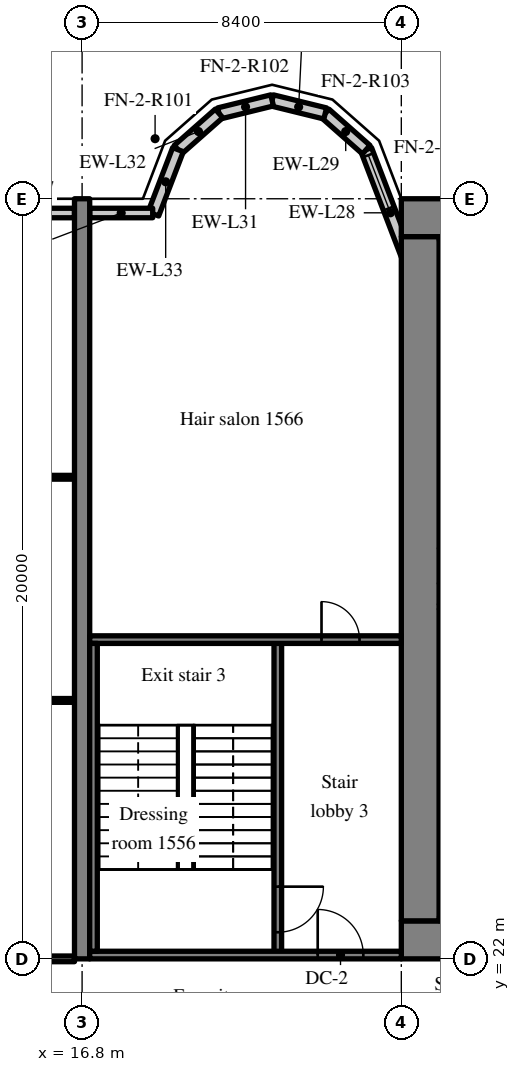
"""IFC4 building model, lengths in metres.
Left out: names, types, materials, properties, quantities, classifications, styles, units other than length and angle.
Written with IfcOpenShell. Run it as: python <this file> out.ifc"""

import sys

from ifc_helpers import new_model, si_unit, direction, frame, frame_2d, origin, place, context, subcontext, project, spatial, rectangle, extrude, source, transform, mapped, element, fill, save


model = new_model("IFC4")
c1 = context("Model", 3, precision=1e-05, world=origin(), true_north=direction((0.0, 1.0)))
c2 = subcontext(c1, "Body", "Model", "MODEL_VIEW")
j1 = project(units=[si_unit("LENGTHUNIT", "METRE"), si_unit("PLANEANGLEUNIT", "RADIAN")], contexts=[c1])
p1 = place(None, origin())
s1 = spatial("IfcSite", under=j1, at=p1, CompositionType="ELEMENT")
p2 = place(p1, origin())
s2 = spatial("IfcBuilding", under=s1, at=p2, CompositionType="ELEMENT")
p3 = place(p2, frame((0.0, 0.0, 65.8)))
s3 = spatial("IfcBuildingStorey", under=s2, at=p3, CompositionType="ELEMENT", Elevation=65.8)
m1 = source(origin(), c2, "Body", "SweptSolid", [
    extrude(rectangle(XDim=50.4, YDim=1.0, at=frame_2d((25.2, 0.0))), origin(), (0.0, 0.0, 1.0), 3.52),
])
p4 = place(p3, frame((25.2, 22.5, 0.0), z_axis=(0.0, 0.0, 1.0), x_axis=(1.0, 0.0, 0.0)))
e1 = element("IfcWall", 1, at=p4, inside=s3, PredefinedType="SHEAR", context=c2, shape_type="MappedRepresentation", body=[
    mapped(m1, transform((0.0, 0.0, 0.0), scale=1.0)),
])
m2 = source(origin(), c2, "Body", "SweptSolid", [
    extrude(rectangle(XDim=1.8, YDim=2.1, at=frame_2d((0.9, 1.05))), frame((0.0, 0.51, 0.0), z_axis=(0.0, -1.0, 0.0), x_axis=(1.0, 0.0, 0.0)), (0.0, 0.0, 1.0), 1.02),
])
p5 = place(p4, frame((15.9, 0.0, 0.0)))
e2 = element("IfcOpeningElement", 2, at=p5, cuts=e1, PredefinedType="OPENING", context=c2, shape_type="MappedRepresentation", body=[
    mapped(m2, transform((0.0, 0.0, 0.0), scale=1.0)),
])
m3 = source(origin(), c2, "Body", "SweptSolid", [
    extrude(rectangle(XDim=1.2, YDim=2.1, at=frame_2d((0.6, 1.05))), frame((0.0, 0.51, 0.0), z_axis=(0.0, -1.0, 0.0), x_axis=(1.0, 0.0, 0.0)), (0.0, 0.0, 1.0), 1.02),
])
p6 = place(p4, frame((26.987, 0.0, 0.0)))
e3 = element("IfcOpeningElement", 3, at=p6, cuts=e1, PredefinedType="OPENING", context=c2, shape_type="MappedRepresentation", body=[
    mapped(m3, transform((0.0, 0.0, 0.0), scale=1.0)),
])
m4 = source(origin(), c2, "Body", "SweptSolid", [
    extrude(rectangle(XDim=0.9, YDim=2.1, at=frame_2d((0.45, 1.05))), frame((0.0, 0.51, 0.0), z_axis=(0.0, -1.0, 0.0), x_axis=(1.0, 0.0, 0.0)), (0.0, 0.0, 1.0), 1.02),
])
p7 = place(p4, frame((34.5, 0.0, 0.0)))
e4 = element("IfcOpeningElement", 4, at=p7, cuts=e1, PredefinedType="OPENING", context=c2, shape_type="MappedRepresentation", body=[
    mapped(m4, transform((0.0, 0.0, 0.0), scale=1.0)),
])
p8 = place(p4, frame((31.5, 0.0, 0.0)))
e5 = element("IfcOpeningElement", 5, at=p8, cuts=e1, PredefinedType="OPENING", context=c2, shape_type="MappedRepresentation", body=[
    mapped(m4, transform((0.0, 0.0, 0.0), scale=1.0)),
])
p9 = place(p4, frame((39.769, 0.0, 0.0)))
e6 = element("IfcOpeningElement", 6, at=p9, cuts=e1, PredefinedType="OPENING", context=c2, shape_type="MappedRepresentation", body=[
    mapped(m4, transform((0.0, 0.0, 0.0), scale=1.0)),
])
p10 = place(p4, frame((36.756, 0.0, 0.0)))
e7 = element("IfcOpeningElement", 7, at=p10, cuts=e1, PredefinedType="OPENING", context=c2, shape_type="MappedRepresentation", body=[
    mapped(m4, transform((0.0, 0.0, 0.0), scale=1.0)),
])
p11 = place(p4, frame((6.438, 0.0, 0.0)))
e8 = element("IfcOpeningElement", 8, at=p11, cuts=e1, PredefinedType="OPENING", context=c2, shape_type="MappedRepresentation", body=[
    mapped(m3, transform((0.0, 0.0, 0.0), scale=1.0)),
])
p12 = place(p4, frame((47.725, 0.0, 0.0)))
e9 = element("IfcOpeningElement", 9, at=p12, cuts=e1, PredefinedType="OPENING", context=c2, shape_type="MappedRepresentation", body=[
    mapped(m3, transform((0.0, 0.0, 0.0), scale=1.0)),
])
p13 = place(p3, frame((25.2, 41.5, 0.0), z_axis=(0.0, 0.0, 1.0), x_axis=(1.0, 0.0, 0.0)))
e10 = element("IfcWall", 10, at=p13, inside=s3, PredefinedType="SHEAR", context=c2, shape_type="MappedRepresentation", body=[
    mapped(m1, transform((0.0, 0.0, 0.0), scale=1.0)),
])
m5 = source(origin(), c2, "Body", "SweptSolid", [
    extrude(rectangle(XDim=18.0, YDim=1.0, at=frame_2d((9.0, 0.0))), origin(), (0.0, 0.0, 1.0), 3.52),
])
p14 = place(p3, frame((25.7, 23.0, 0.0), z_axis=(0.0, 0.0, 1.0), x_axis=(0.0, 1.0, 0.0)))
e11 = element("IfcWall", 11, at=p14, inside=s3, PredefinedType="SHEAR", context=c2, shape_type="MappedRepresentation", body=[
    mapped(m5, transform((0.0, 0.0, 0.0), scale=1.0)),
])
m6 = source(origin(), c2, "Body", "SweptSolid", [
    extrude(rectangle(XDim=20.0, YDim=0.4, at=frame_2d((10.0, 0.0))), origin(), (0.0, 0.0, 1.0), 3.52),
])
p15 = place(p3, frame((16.8, 22.0, 0.0), z_axis=(0.0, 0.0, 1.0), x_axis=(0.0, 1.0, 0.0)))
e12 = element("IfcWall", 12, at=p15, inside=s3, PredefinedType="SHEAR", context=c2, shape_type="MappedRepresentation", body=[
    mapped(m6, transform((0.0, 0.0, 0.0), scale=1.0)),
])
m7 = source(origin(), c2, "Body", "SweptSolid", [
    extrude(rectangle(XDim=3.559, YDim=0.3, at=frame_2d((1.78, 0.0))), origin(), (0.0, 0.0, 1.0), 3.52),
])
p16 = place(p3, frame((25.55, 39.969, 0.0), z_axis=(0.0, 0.0, 1.0), x_axis=(-0.35779745313, 0.933799219604, 0.0)))
e13 = element("IfcWall", 13, at=p16, inside=s3, PredefinedType="SOLIDWALL", context=c2, shape_type="MappedRepresentation", body=[
    mapped(m7, transform((0.0, 0.0, 0.0), scale=1.0)),
])
m8 = source(origin(), c2, "Body", "SweptSolid", [
    extrude(rectangle(XDim=1.5, YDim=2.0, at=frame_2d((0.75, 1.0))), frame((0.0, 0.16, 0.0), z_axis=(0.0, -1.0, 0.0), x_axis=(1.0, 0.0, 0.0)), (0.0, 0.0, 1.0), 0.32),
])
p17 = place(p16, frame((1.903, 0.0, 0.9)))
e14 = element("IfcOpeningElement", 14, at=p17, cuts=e13, PredefinedType="OPENING", context=c2, shape_type="MappedRepresentation", body=[
    mapped(m8, transform((0.0, 0.0, 0.0), scale=1.0)),
])
m9 = source(origin(), c2, "Body", "SweptSolid", [
    extrude(rectangle(XDim=1.44, YDim=0.3, at=frame_2d((0.72, 0.0))), origin(), (0.0, 0.0, 1.0), 3.52),
])
p18 = place(p3, frame((24.277, 43.292, 0.0), z_axis=(0.0, 0.0, 1.0), x_axis=(-0.749649827867, 0.661834673902, 0.0)))
e15 = element("IfcWall", 15, at=p18, inside=s3, PredefinedType="SOLIDWALL", context=c2, shape_type="MappedRepresentation", body=[
    mapped(m9, transform((0.0, 0.0, 0.0), scale=1.0)),
])
m10 = source(origin(), c2, "Body", "SweptSolid", [
    extrude(rectangle(XDim=1.438, YDim=0.3, at=frame_2d((0.719, 0.0))), origin(), (0.0, 0.0, 1.0), 3.52),
])
p19 = place(p3, frame((23.197, 44.245, 0.0), z_axis=(0.0, 0.0, 1.0), x_axis=(-0.971152283879, 0.238460146601, 0.0)))
e16 = element("IfcWall", 16, at=p19, inside=s3, PredefinedType="SOLIDWALL", context=c2, shape_type="MappedRepresentation", body=[
    mapped(m10, transform((0.0, 0.0, 0.0), scale=1.0)),
])
m11 = source(origin(), c2, "Body", "SweptSolid", [
    extrude(rectangle(XDim=1.439, YDim=0.3, at=frame_2d((0.719, 0.0))), origin(), (0.0, 0.0, 1.0), 3.52),
])
p20 = place(p3, frame((21.8, 44.588, 0.0), z_axis=(0.0, 0.0, 1.0), x_axis=(-0.971161932466, -0.238420848351, 0.0)))
e17 = element("IfcWall", 17, at=p20, inside=s3, PredefinedType="SOLIDWALL", context=c2, shape_type="MappedRepresentation", body=[
    mapped(m11, transform((0.0, 0.0, 0.0), scale=1.0)),
])
m12 = source(origin(), c2, "Body", "SweptSolid", [
    extrude(rectangle(XDim=1.44, YDim=0.3, at=frame_2d((0.72, 0.0))), origin(), (0.0, 0.0, 1.0), 3.52),
])
p21 = place(p3, frame((20.403, 44.245, 0.0), z_axis=(0.0, 0.0, 1.0), x_axis=(-0.74957555648, -0.661918790432, 0.0)))
e18 = element("IfcWall", 18, at=p21, inside=s3, PredefinedType="SOLIDWALL", context=c2, shape_type="MappedRepresentation", body=[
    mapped(m12, transform((0.0, 0.0, 0.0), scale=1.0)),
])
m13 = source(origin(), c2, "Body", "SweptSolid", [
    extrude(rectangle(XDim=1.812, YDim=0.3, at=frame_2d((0.906, 0.0))), origin(), (0.0, 0.0, 1.0), 3.52),
])
p22 = place(p3, frame((19.323, 43.292, 0.0), z_axis=(0.0, 0.0, 1.0), x_axis=(-0.357877270961, -0.93376863244, 0.0)))
e19 = element("IfcWall", 19, at=p22, inside=s3, PredefinedType="SOLIDWALL", context=c2, shape_type="MappedRepresentation", body=[
    mapped(m13, transform((0.0, 0.0, 0.0), scale=1.0)),
])
m14 = source(origin(), c2, "Body", "SweptSolid", [
    extrude(rectangle(XDim=3.6, YDim=0.25, at=frame_2d((1.8, 0.0))), origin(), (0.0, 0.0, 1.0), 2.82),
])
p23 = place(p3, frame((16.6, 41.625, 0.0), z_axis=(0.0, 0.0, 1.0), x_axis=(-1.0, 0.0, 0.0)))
e20 = element("IfcWall", 20, at=p23, inside=s3, PredefinedType="SOLIDWALL", context=c2, shape_type="MappedRepresentation", body=[
    mapped(m14, transform((0.0, 0.0, 0.0), scale=1.0)),
])
m15 = source(origin(), c2, "Body", "SweptSolid", [
    extrude(rectangle(XDim=1.5, YDim=1.5, at=frame_2d((0.75, 0.75))), frame((0.0, 0.135, 0.0), z_axis=(0.0, -1.0, 0.0), x_axis=(1.0, 0.0, 0.0)), (0.0, 0.0, 1.0), 0.27),
])
p24 = place(p23, frame((1.05, 0.0, 0.9)))
e21 = element("IfcOpeningElement", 21, at=p24, cuts=e20, PredefinedType="OPENING", context=c2, shape_type="MappedRepresentation", body=[
    mapped(m15, transform((0.0, 0.0, 0.0), scale=1.0)),
])
m16 = source(origin(), c2, "Body", "SweptSolid", [
    extrude(rectangle(XDim=1.658, YDim=0.25, at=frame_2d((0.829, 0.0))), origin(), (0.0, 0.0, 1.0), 2.82),
])
p25 = place(p3, frame((18.658, 41.625, 0.0), z_axis=(0.0, 0.0, 1.0), x_axis=(-1.0, 0.0, 0.0)))
e22 = element("IfcWall", 22, at=p25, inside=s3, PredefinedType="SOLIDWALL", context=c2, shape_type="MappedRepresentation", body=[
    mapped(m16, transform((0.0, 0.0, 0.0), scale=1.0)),
])
m17 = source(origin(), c2, "Body", "SweptSolid", [
    extrude(rectangle(XDim=8.3, YDim=0.2, at=frame_2d((4.15, 0.0))), origin(), (0.0, 0.0, 1.0), 3.52),
])
p26 = place(p3, frame((21.95, 22.1, 0.0), z_axis=(0.0, 0.0, 1.0), x_axis=(0.0, 1.0, 0.0)))
e23 = element("IfcWall", 23, at=p26, inside=s3, PredefinedType="SOLIDWALL", context=c2, shape_type="MappedRepresentation", body=[
    mapped(m17, transform((0.0, 0.0, 0.0), scale=1.0)),
])
m18 = source(origin(), c2, "Body", "SweptSolid", [
    extrude(rectangle(XDim=1.2, YDim=2.1, at=frame_2d((0.6, 1.05))), frame((0.0, 0.11, 0.0), z_axis=(0.0, -1.0, 0.0), x_axis=(1.0, 0.0, 0.0)), (0.0, 0.0, 1.0), 0.22),
])
p27 = place(p26, frame((0.6, 0.0, 0.0)))
e24 = element("IfcOpeningElement", 24, at=p27, cuts=e23, PredefinedType="OPENING", context=c2, shape_type="MappedRepresentation", body=[
    mapped(m18, transform((0.0, 0.0, 0.0), scale=1.0)),
])
m19 = source(origin(), c2, "Body", "SweptSolid", [
    extrude(rectangle(XDim=8.2, YDim=0.2, at=frame_2d((4.1, 0.0))), origin(), (0.0, 0.0, 1.0), 3.52),
])
p28 = place(p3, frame((17.0, 22.1, 0.0), z_axis=(0.0, 0.0, 1.0), x_axis=(1.0, 0.0, 0.0)))
e25 = element("IfcWall", 25, at=p28, inside=s3, PredefinedType="SOLIDWALL", context=c2, shape_type="MappedRepresentation", body=[
    mapped(m19, transform((0.0, 0.0, 0.0), scale=1.0)),
])
p29 = place(p28, frame((6.0, 0.0, 0.0)))
e26 = element("IfcOpeningElement", 26, at=p29, cuts=e25, PredefinedType="OPENING", context=c2, shape_type="MappedRepresentation", body=[
    mapped(m18, transform((0.0, 0.0, 0.0), scale=1.0)),
])
p30 = place(p3, frame((17.0, 30.4, 0.0), z_axis=(0.0, 0.0, 1.0), x_axis=(1.0, 0.0, 0.0)))
e27 = element("IfcWall", 27, at=p30, inside=s3, PredefinedType="SOLIDWALL", context=c2, shape_type="MappedRepresentation", body=[
    mapped(m19, transform((0.0, 0.0, 0.0), scale=1.0)),
])
m20 = source(origin(), c2, "Body", "SweptSolid", [
    extrude(rectangle(XDim=1.0, YDim=2.1, at=frame_2d((0.5, 1.05))), frame((0.0, 0.11, 0.0), z_axis=(0.0, -1.0, 0.0), x_axis=(1.0, 0.0, 0.0)), (0.0, 0.0, 1.0), 0.22),
])
p31 = place(p30, frame((6.1, 0.0, 0.0)))
e28 = element("IfcOpeningElement", 28, at=p31, cuts=e27, PredefinedType="OPENING", context=c2, shape_type="MappedRepresentation", body=[
    mapped(m20, transform((0.0, 0.0, 0.0), scale=1.0)),
])
m21 = source(origin(), c2, "Body", "SweptSolid", [
    extrude(rectangle(XDim=8.1, YDim=0.2, at=frame_2d((4.05, 0.0))), origin(), (0.0, 0.0, 1.0), 3.52),
])
p32 = place(p3, frame((17.1, 22.2, 0.0), z_axis=(0.0, 0.0, 1.0), x_axis=(0.0, 1.0, 0.0)))
e29 = element("IfcWall", 29, at=p32, inside=s3, PredefinedType="SOLIDWALL", context=c2, shape_type="MappedRepresentation", body=[
    mapped(m21, transform((0.0, 0.0, 0.0), scale=1.0)),
])
m22 = source(origin(), c2, "Body", "SweptSolid", [
    extrude(rectangle(XDim=2.25, YDim=0.1, at=frame_2d((1.125, 0.0))), origin(), (0.0, 0.0, 1.0), 3.52),
])
p33 = place(p3, frame((14.35, 28.8, 0.0), z_axis=(0.0, 0.0, 1.0), x_axis=(1.0, 0.0, 0.0)))
e30 = element("IfcWall", 30, at=p33, inside=s3, PredefinedType="PARTITIONING", context=c2, shape_type="MappedRepresentation", body=[
    mapped(m22, transform((0.0, 0.0, 0.0), scale=1.0)),
])
m23 = source(origin(), c2, "Body", "SweptSolid", [
    extrude(rectangle(XDim=0.9, YDim=2.1, at=frame_2d((0.45, 1.05))), frame((0.0, 0.06, 0.0), z_axis=(0.0, -1.0, 0.0), x_axis=(1.0, 0.0, 0.0)), (0.0, 0.0, 1.0), 0.12),
])
p34 = place(p33, frame((0.675, 0.0, 0.0)))
e31 = element("IfcOpeningElement", 31, at=p34, cuts=e30, PredefinedType="OPENING", context=c2, shape_type="MappedRepresentation", body=[
    mapped(m23, transform((0.0, 0.0, 0.0), scale=1.0)),
])
m24 = source(origin(), c2, "Body", "SweptSolid", [
    extrude(rectangle(XDim=8.0, YDim=0.1, at=frame_2d((4.0, 0.0))), origin(), (0.0, 0.0, 1.0), 3.52),
])
p35 = place(p3, frame((8.6, 34.672, 0.0), z_axis=(0.0, 0.0, 1.0), x_axis=(1.0, 0.0, 0.0)))
e32 = element("IfcWall", 32, at=p35, inside=s3, PredefinedType="PARTITIONING", context=c2, shape_type="MappedRepresentation", body=[
    mapped(m24, transform((0.0, 0.0, 0.0), scale=1.0)),
])
m25 = source(origin(), c2, "Body", "SweptSolid", [
    extrude(rectangle(XDim=1.8, YDim=2.1, at=frame_2d((0.9, 1.05))), frame((0.0, 0.06, 0.0), z_axis=(0.0, -1.0, 0.0), x_axis=(1.0, 0.0, 0.0)), (0.0, 0.0, 1.0), 0.12),
])
p36 = place(p35, frame((3.1, 0.0, 0.0)))
e33 = element("IfcOpeningElement", 33, at=p36, cuts=e32, PredefinedType="OPENING", context=c2, shape_type="MappedRepresentation", body=[
    mapped(m25, transform((0.0, 0.0, 0.0), scale=1.0)),
])
m26 = source(origin(), c2, "Body", "SweptSolid", [
    extrude(rectangle(XDim=8.0, YDim=0.15, at=frame_2d((4.0, 0.0))), origin(), (0.0, 0.0, 1.0), 2.82),
])
p37 = place(p3, frame((8.6, 22.0, 0.0), z_axis=(0.0, 0.0, 1.0), x_axis=(1.0, 0.0, 0.0)))
e34 = element("IfcWall", 34, at=p37, inside=s3, PredefinedType="PARTITIONING", context=c2, shape_type="MappedRepresentation", body=[
    mapped(m26, transform((0.0, 0.0, 0.0), scale=1.0)),
])
m27 = source(origin(), c2, "Body", "SweptSolid", [
    extrude(rectangle(XDim=1.0, YDim=2.1, at=frame_2d((0.5, 1.05))), frame((0.0, 0.085, 0.0), z_axis=(0.0, -1.0, 0.0), x_axis=(1.0, 0.0, 0.0)), (0.0, 0.0, 1.0), 0.17),
])
p38 = place(p37, frame((0.55, 0.0, 0.0)))
e35 = element("IfcOpeningElement", 35, at=p38, cuts=e34, PredefinedType="OPENING", context=c2, shape_type="MappedRepresentation", body=[
    mapped(m27, transform((0.0, 0.0, 0.0), scale=1.0)),
])
m28 = source(origin(), c2, "Body", "SweptSolid", [
    extrude(rectangle(XDim=1.5, YDim=2.0, at=frame_2d((0.75, 1.0))), frame((0.0, 0.03, 0.0), z_axis=(0.0, -1.0, 0.0), x_axis=(1.0, 0.0, 0.0)), (0.0, 0.0, 1.0), 0.06),
])
p39 = place(p17, origin())
e36 = element("IfcWindow", 36, at=p39, inside=s3, PartitioningType="SINGLE_PANEL", PredefinedType="WINDOW", context=c2, shape_type="MappedRepresentation", body=[
    mapped(m28, transform((0.0, 0.0, 0.0), scale=1.0)),
])
fill(e14, e36)
m29 = source(origin(), c2, "Body", "SweptSolid", [
    extrude(rectangle(XDim=1.2, YDim=2.1, at=frame_2d((0.6, 1.05))), frame((0.0, 0.025, 0.0), z_axis=(0.0, -1.0, 0.0), x_axis=(1.0, 0.0, 0.0)), (0.0, 0.0, 1.0), 0.05),
])
p40 = place(p27, origin())
e37 = element("IfcDoor", 37, at=p40, inside=s3, OperationType="SINGLE_SWING_RIGHT", PredefinedType="DOOR", context=c2, shape_type="MappedRepresentation", body=[
    mapped(m29, transform((0.0, 0.0, 0.0), scale=1.0)),
])
fill(e24, e37)
p41 = place(p29, origin())
e38 = element("IfcDoor", 38, at=p41, inside=s3, OperationType="SINGLE_SWING_LEFT", PredefinedType="DOOR", context=c2, shape_type="MappedRepresentation", body=[
    mapped(m29, transform((0.0, 0.0, 0.0), scale=1.0)),
])
fill(e26, e38)
m30 = source(origin(), c2, "Body", "SweptSolid", [
    extrude(rectangle(XDim=1.0, YDim=2.1, at=frame_2d((0.5, 1.05))), frame((0.0, 0.025, 0.0), z_axis=(0.0, -1.0, 0.0), x_axis=(1.0, 0.0, 0.0)), (0.0, 0.0, 1.0), 0.05),
])
p42 = place(p31, origin())
e39 = element("IfcDoor", 39, at=p42, inside=s3, OperationType="SINGLE_SWING_LEFT", PredefinedType="DOOR", context=c2, shape_type="MappedRepresentation", body=[
    mapped(m30, transform((0.0, 0.0, 0.0), scale=1.0)),
])
fill(e28, e39)
save(model, sys.argv[1])
